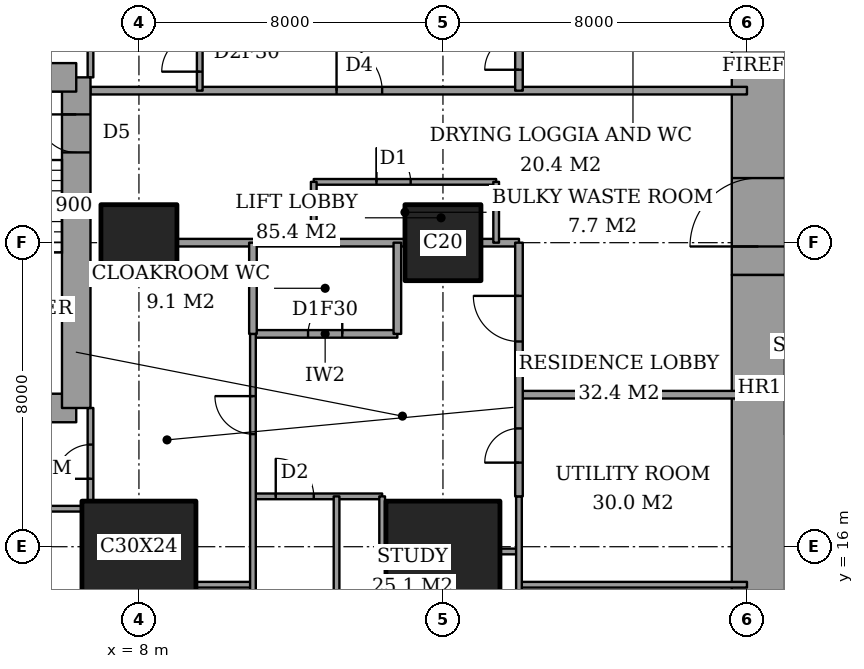
"""IFC4 building model, lengths in metres.
Left out: names, types, materials, properties, quantities, classifications, styles, units other than length and angle.
Written with IfcOpenShell. Run it as: python <this file> out.ifc"""

import sys

from ifc_helpers import new_model, si_unit, direction, frame, frame_2d, origin, origin_2d, place, context, subcontext, project, spatial, rectangle, extrude, element, fill, save


model = new_model("IFC4")
c1 = context("Model", 3, precision=1e-05, world=origin(), true_north=direction((0.0, 1.0)))
c2 = subcontext(c1, "Body", "Model", "MODEL_VIEW")
j1 = project(units=[si_unit("LENGTHUNIT", "METRE"), si_unit("PLANEANGLEUNIT", "RADIAN")], contexts=[c1])
p1 = place(None, origin())
s1 = spatial("IfcSite", under=j1, at=p1, CompositionType="ELEMENT")
p2 = place(p1, origin())
s2 = spatial("IfcBuilding", under=s1, at=p2, CompositionType="ELEMENT")
p3 = place(p2, frame((0.0, 0.0, 143.0)))
s3 = spatial("IfcBuildingStorey", under=s2, at=p3, CompositionType="ELEMENT", Elevation=143.0)
p4 = place(p3, frame((8.0, 16.0, 0.0), z_axis=(0.0, 0.0, 1.0), x_axis=(1.0, 0.0, 0.0)))
e1 = element("IfcColumn", 1, at=p4, inside=s3, PredefinedType="COLUMN", context=c2, shape_type="SweptSolid", body=[
    extrude(rectangle(XDim=3.0, YDim=2.4, at=origin_2d()), origin(), (0.0, 0.0, 1.0), 3.6),
])
p5 = place(p3, frame((8.0, 24.0, 0.0), z_axis=(0.0, 0.0, 1.0), x_axis=(1.0, 0.0, 0.0)))
e2 = element("IfcColumn", 2, at=p5, inside=s3, PredefinedType="COLUMN", context=c2, shape_type="SweptSolid", body=[
    extrude(rectangle(XDim=2.0, YDim=2.0, at=origin_2d()), origin(), (0.0, 0.0, 1.0), 3.6),
])
p6 = place(p3, frame((16.0, 16.0, 0.0), z_axis=(0.0, 0.0, 1.0), x_axis=(1.0, 0.0, 0.0)))
e3 = element("IfcColumn", 3, at=p6, inside=s3, PredefinedType="COLUMN", context=c2, shape_type="SweptSolid", body=[
    extrude(rectangle(XDim=3.0, YDim=2.4, at=origin_2d()), origin(), (0.0, 0.0, 1.0), 3.6),
])
p7 = place(p3, frame((16.0, 24.0, 0.0), z_axis=(0.0, 0.0, 1.0), x_axis=(1.0, 0.0, 0.0)))
e4 = element("IfcColumn", 4, at=p7, inside=s3, PredefinedType="COLUMN", context=c2, shape_type="SweptSolid", body=[
    extrude(rectangle(XDim=2.0, YDim=2.0, at=origin_2d()), origin(), (0.0, 0.0, 1.0), 3.6),
])
p8 = place(p3, frame((24.3, 13.0, 0.0), z_axis=(0.0, 0.0, 1.0), x_axis=(0.0, 1.0, 0.0)))
e5 = element("IfcWall", 5, at=p8, inside=s3, PredefinedType="SHEAR", context=c2, shape_type="SweptSolid", body=[
    extrude(rectangle(XDim=10.15, YDim=1.4, at=frame_2d((5.075, 0.0))), origin(), (0.0, 0.0, 1.0), 3.6),
])
p9 = place(p3, frame((24.3, 23.15, 0.0), z_axis=(0.0, 0.0, 1.0), x_axis=(0.0, 1.0, 0.0)))
e6 = element("IfcWall", 6, at=p9, inside=s3, PredefinedType="SHEAR", context=c2, shape_type="SweptSolid", body=[
    extrude(rectangle(XDim=11.85, YDim=1.4, at=frame_2d((5.925, 0.0))), origin(), (0.0, 0.0, 1.0), 3.6),
])
p10 = place(p9, frame((0.75, 0.0, 0.0)))
e7 = element("IfcOpeningElement", 7, at=p10, cuts=e6, PredefinedType="OPENING", context=c2, shape_type="SweptSolid", body=[
    extrude(rectangle(XDim=1.8, YDim=2.4, at=frame_2d((0.9, 1.2))), frame((0.0, 0.71, 0.0), z_axis=(0.0, -1.0, 0.0), x_axis=(1.0, 0.0, 0.0)), (0.0, 0.0, 1.0), 1.42),
])
p11 = place(p3, frame((1.9, 19.65, 0.0), z_axis=(0.0, 0.0, 1.0), x_axis=(1.0, 0.0, 0.0)))
e8 = element("IfcWall", 8, at=p11, inside=s3, PredefinedType="SHEAR", context=c2, shape_type="SweptSolid", body=[
    extrude(rectangle(XDim=4.45, YDim=0.75, at=frame_2d((2.225, 0.0))), origin(), (0.0, 0.0, 1.0), 3.6),
])
p12 = place(p3, frame((6.35, 19.65, 0.0), z_axis=(0.0, 0.0, 1.0), x_axis=(0.0, 1.0, 0.0)))
e9 = element("IfcWall", 9, at=p12, inside=s3, PredefinedType="SHEAR", context=c2, shape_type="SweptSolid", body=[
    extrude(rectangle(XDim=8.7, YDim=0.75, at=frame_2d((4.35, 0.0))), origin(), (0.0, 0.0, 1.0), 3.6),
])
p13 = place(p12, frame((6.725, 0.0, 0.0)))
e10 = element("IfcOpeningElement", 10, at=p13, cuts=e9, PredefinedType="OPENING", context=c2, shape_type="SweptSolid", body=[
    extrude(rectangle(XDim=1.0, YDim=2.1, at=frame_2d((0.5, 1.05))), frame((0.0, 0.385, 0.0), z_axis=(0.0, -1.0, 0.0), x_axis=(1.0, 0.0, 0.0)), (0.0, 0.0, 1.0), 0.77),
])
p14 = place(p3, frame((6.35, 28.35, 0.0), z_axis=(0.0, 0.0, 1.0), x_axis=(-1.0, 0.0, 0.0)))
e11 = element("IfcWall", 11, at=p14, inside=s3, PredefinedType="SHEAR", context=c2, shape_type="SweptSolid", body=[
    extrude(rectangle(XDim=4.45, YDim=0.75, at=frame_2d((2.225, 0.0))), origin(), (0.0, 0.0, 1.0), 3.6),
])
p15 = place(p3, frame((9.5, 15.0, 0.0), z_axis=(0.0, 0.0, 1.0), x_axis=(1.0, 0.0, 0.0)))
e12 = element("IfcWall", 12, at=p15, inside=s3, PredefinedType="PARTITIONING", context=c2, shape_type="SweptSolid", body=[
    extrude(rectangle(XDim=1.5, YDim=0.15, at=frame_2d((0.75, 0.0))), origin(), (0.0, 0.0, 1.0), 3.35),
])
p16 = place(p3, frame((18.0, 15.0, 0.0), z_axis=(0.0, 0.0, 1.0), x_axis=(1.0, 0.0, 0.0)))
e13 = element("IfcWall", 13, at=p16, inside=s3, PredefinedType="PARTITIONING", context=c2, shape_type="SweptSolid", body=[
    extrude(rectangle(XDim=6.0, YDim=0.15, at=frame_2d((3.0, 0.0))), origin(), (0.0, 0.0, 1.0), 3.35),
])
p17 = place(p3, frame((17.5, 15.875, 0.0), z_axis=(0.0, 0.0, 1.0), x_axis=(1.0, 0.0, 0.0)))
e14 = element("IfcWall", 14, at=p17, inside=s3, PredefinedType="PARTITIONING", context=c2, shape_type="SweptSolid", body=[
    extrude(rectangle(XDim=0.5, YDim=0.15, at=frame_2d((0.25, 0.0))), origin(), (0.0, 0.0, 1.0), 2.634),
])
p18 = place(p3, frame((1.35, 17.0, 0.0), z_axis=(0.0, 0.0, 1.0), x_axis=(1.0, 0.0, 0.0)))
e15 = element("IfcWall", 15, at=p18, inside=s3, PredefinedType="PARTITIONING", context=c2, shape_type="SweptSolid", body=[
    extrude(rectangle(XDim=5.15, YDim=0.15, at=frame_2d((2.575, 0.0))), origin(), (0.0, 0.0, 1.0), 3.35),
])
p19 = place(p3, frame((11.0, 17.325, 0.0), z_axis=(0.0, 0.0, 1.0), x_axis=(1.0, 0.0, 0.0)))
e16 = element("IfcWall", 16, at=p19, inside=s3, PredefinedType="PARTITIONING", context=c2, shape_type="SweptSolid", body=[
    extrude(rectangle(XDim=3.4, YDim=0.15, at=frame_2d((1.7, 0.0))), origin(), (0.0, 0.0, 1.0), 3.35),
])
p20 = place(p19, frame((0.6, 0.0, 0.0)))
e17 = element("IfcOpeningElement", 17, at=p20, cuts=e16, PredefinedType="OPENING", context=c2, shape_type="SweptSolid", body=[
    extrude(rectangle(XDim=1.0, YDim=2.1, at=frame_2d((0.5, 1.05))), frame((0.0, 0.085, 0.0), z_axis=(0.0, -1.0, 0.0), x_axis=(1.0, 0.0, 0.0)), (0.0, 0.0, 1.0), 0.17),
])
p21 = place(p3, frame((18.0, 20.0, 0.0), z_axis=(0.0, 0.0, 1.0), x_axis=(1.0, 0.0, 0.0)))
e18 = element("IfcWall", 18, at=p21, inside=s3, PredefinedType="PARTITIONING", context=c2, shape_type="SweptSolid", body=[
    extrude(rectangle(XDim=6.0, YDim=0.2, at=frame_2d((3.0, 0.0))), origin(), (0.0, 0.0, 1.0), 3.35),
])
p22 = place(p3, frame((11.0, 21.6, 0.0), z_axis=(0.0, 0.0, 1.0), x_axis=(1.0, 0.0, 0.0)))
e19 = element("IfcWall", 19, at=p22, inside=s3, PredefinedType="PARTITIONING", context=c2, shape_type="SweptSolid", body=[
    extrude(rectangle(XDim=3.8, YDim=0.2, at=frame_2d((1.9, 0.0))), origin(), (0.0, 0.0, 1.0), 3.35),
])
p23 = place(p22, frame((1.45, 0.0, 0.0)))
e20 = element("IfcOpeningElement", 20, at=p23, cuts=e19, PredefinedType="OPENING", context=c2, shape_type="SweptSolid", body=[
    extrude(rectangle(XDim=0.9, YDim=2.1, at=frame_2d((0.45, 1.05))), frame((0.0, 0.11, 0.0), z_axis=(0.0, -1.0, 0.0), x_axis=(1.0, 0.0, 0.0)), (0.0, 0.0, 1.0), 0.22),
])
p24 = place(p3, frame((9.0, 24.0, 0.0), z_axis=(0.0, 0.0, 1.0), x_axis=(1.0, 0.0, 0.0)))
e21 = element("IfcWall", 21, at=p24, inside=s3, PredefinedType="PARTITIONING", context=c2, shape_type="SweptSolid", body=[
    extrude(rectangle(XDim=6.0, YDim=0.2, at=frame_2d((3.0, 0.0))), origin(), (0.0, 0.0, 1.0), 3.35),
])
p25 = place(p3, frame((17.0, 24.0, 0.0), z_axis=(0.0, 0.0, 1.0), x_axis=(1.0, 0.0, 0.0)))
e22 = element("IfcWall", 22, at=p25, inside=s3, PredefinedType="PARTITIONING", context=c2, shape_type="SweptSolid", body=[
    extrude(rectangle(XDim=1.0, YDim=0.2, at=frame_2d((0.5, 0.0))), origin(), (0.0, 0.0, 1.0), 3.35),
])
p26 = place(p3, frame((12.6, 25.6, 0.0), z_axis=(0.0, 0.0, 1.0), x_axis=(1.0, 0.0, 0.0)))
e23 = element("IfcWall", 23, at=p26, inside=s3, PredefinedType="PARTITIONING", context=c2, shape_type="SweptSolid", body=[
    extrude(rectangle(XDim=4.8, YDim=0.15, at=frame_2d((2.4, 0.0))), origin(), (0.0, 0.0, 1.0), 3.35),
])
p27 = place(p26, frame((1.65, 0.0, 0.0)))
e24 = element("IfcOpeningElement", 24, at=p27, cuts=e23, PredefinedType="OPENING", context=c2, shape_type="SweptSolid", body=[
    extrude(rectangle(XDim=0.9, YDim=2.1, at=frame_2d((0.45, 1.05))), frame((0.0, 0.085, 0.0), z_axis=(0.0, -1.0, 0.0), x_axis=(1.0, 0.0, 0.0)), (0.0, 0.0, 1.0), 0.17),
])
p28 = place(p3, frame((6.725, 28.0, 0.0), z_axis=(0.0, 0.0, 1.0), x_axis=(1.0, 0.0, 0.0)))
e25 = element("IfcWall", 25, at=p28, inside=s3, PredefinedType="PARTITIONING", context=c2, shape_type="SweptSolid", body=[
    extrude(rectangle(XDim=17.275, YDim=0.2, at=frame_2d((8.637, 0.0))), origin(), (0.0, 0.0, 1.0), 3.35),
])
p29 = place(p28, frame((6.475, 0.0, 0.0)))
e26 = element("IfcOpeningElement", 26, at=p29, cuts=e25, PredefinedType="OPENING", context=c2, shape_type="SweptSolid", body=[
    extrude(rectangle(XDim=1.2, YDim=2.4, at=frame_2d((0.6, 1.2))), frame((0.0, 0.11, 0.0), z_axis=(0.0, -1.0, 0.0), x_axis=(1.0, 0.0, 0.0)), (0.0, 0.0, 1.0), 0.22),
])
p30 = place(p3, frame((6.725, 17.2, 0.0), z_axis=(0.0, 0.0, 1.0), x_axis=(0.0, 1.0, 0.0)))
e27 = element("IfcWall", 27, at=p30, inside=s3, PredefinedType="PARTITIONING", context=c2, shape_type="SweptSolid", body=[
    extrude(rectangle(XDim=2.45, YDim=0.15, at=frame_2d((1.225, 0.0))), origin(), (0.0, 0.0, 1.0), 3.35),
])
p31 = place(p30, frame((0.587, 0.0, 0.0)))
e28 = element("IfcOpeningElement", 28, at=p31, cuts=e27, PredefinedType="OPENING", context=c2, shape_type="SweptSolid", body=[
    extrude(rectangle(XDim=0.9, YDim=2.1, at=frame_2d((0.45, 1.05))), frame((0.0, 0.085, 0.0), z_axis=(0.0, -1.0, 0.0), x_axis=(1.0, 0.0, 0.0)), (0.0, 0.0, 1.0), 0.17),
])
p32 = place(p3, frame((6.725, 28.35, 0.0), z_axis=(0.0, 0.0, 1.0), x_axis=(0.0, 1.0, 0.0)))
e29 = element("IfcWall", 29, at=p32, inside=s3, PredefinedType="PARTITIONING", context=c2, shape_type="SweptSolid", body=[
    extrude(rectangle(XDim=2.45, YDim=0.15, at=frame_2d((1.225, 0.0))), origin(), (0.0, 0.0, 1.0), 3.35),
])
p33 = place(p32, frame((0.913, 0.0, 0.0)))
e30 = element("IfcOpeningElement", 30, at=p33, cuts=e29, PredefinedType="OPENING", context=c2, shape_type="SweptSolid", body=[
    extrude(rectangle(XDim=1.0, YDim=2.1, at=frame_2d((0.5, 1.05))), frame((0.0, 0.085, 0.0), z_axis=(0.0, -1.0, 0.0), x_axis=(1.0, 0.0, 0.0)), (0.0, 0.0, 1.0), 0.17),
])
p34 = place(p3, frame((9.6, 28.0, 0.0), z_axis=(0.0, 0.0, 1.0), x_axis=(0.0, 1.0, 0.0)))
e31 = element("IfcWall", 31, at=p34, inside=s3, PredefinedType="PARTITIONING", context=c2, shape_type="SweptSolid", body=[
    extrude(rectangle(XDim=9.4, YDim=0.15, at=frame_2d((4.7, 0.0))), origin(), (0.0, 0.0, 1.0), 3.35),
])
p35 = place(p34, frame((0.5, 0.0, 0.0)))
e32 = element("IfcOpeningElement", 32, at=p35, cuts=e31, PredefinedType="OPENING", context=c2, shape_type="SweptSolid", body=[
    extrude(rectangle(XDim=1.0, YDim=2.1, at=frame_2d((0.5, 1.05))), frame((0.0, 0.085, 0.0), z_axis=(0.0, -1.0, 0.0), x_axis=(1.0, 0.0, 0.0)), (0.0, 0.0, 1.0), 0.17),
])
p36 = place(p3, frame((11.0, 21.6, 0.0), z_axis=(0.0, 0.0, 1.0), x_axis=(0.0, 1.0, 0.0)))
e33 = element("IfcWall", 33, at=p36, inside=s3, PredefinedType="PARTITIONING", context=c2, shape_type="SweptSolid", body=[
    extrude(rectangle(XDim=2.4, YDim=0.2, at=frame_2d((1.2, 0.0))), origin(), (0.0, 0.0, 1.0), 3.35),
])
p37 = place(p3, frame((11.0, 11.0, 0.0), z_axis=(0.0, 0.0, 1.0), x_axis=(0.0, 1.0, 0.0)))
e34 = element("IfcWall", 34, at=p37, inside=s3, PredefinedType="PARTITIONING", context=c2, shape_type="SweptSolid", body=[
    extrude(rectangle(XDim=10.6, YDim=0.15, at=frame_2d((5.3, 0.0))), origin(), (0.0, 0.0, 1.0), 3.35),
])
p38 = place(p37, frame((7.962, 0.0, 0.0)))
e35 = element("IfcOpeningElement", 35, at=p38, cuts=e34, PredefinedType="OPENING", context=c2, shape_type="SweptSolid", body=[
    extrude(rectangle(XDim=1.0, YDim=2.1, at=frame_2d((0.5, 1.05))), frame((0.0, 0.085, 0.0), z_axis=(0.0, -1.0, 0.0), x_axis=(1.0, 0.0, 0.0)), (0.0, 0.0, 1.0), 0.17),
])
p39 = place(p3, frame((12.6, 24.0, 0.0), z_axis=(0.0, 0.0, 1.0), x_axis=(0.0, 1.0, 0.0)))
e36 = element("IfcWall", 36, at=p39, inside=s3, PredefinedType="PARTITIONING", context=c2, shape_type="SweptSolid", body=[
    extrude(rectangle(XDim=1.6, YDim=0.15, at=frame_2d((0.8, 0.0))), origin(), (0.0, 0.0, 1.0), 3.35),
])
p40 = place(p3, frame((13.2, 11.0, 0.0), z_axis=(0.0, 0.0, 1.0), x_axis=(0.0, 1.0, 0.0)))
e37 = element("IfcWall", 37, at=p40, inside=s3, PredefinedType="PARTITIONING", context=c2, shape_type="SweptSolid", body=[
    extrude(rectangle(XDim=6.325, YDim=0.15, at=frame_2d((3.163, 0.0))), origin(), (0.0, 0.0, 1.0), 3.35),
])
p41 = place(p3, frame((14.4, 15.875, 0.0), z_axis=(0.0, 0.0, 1.0), x_axis=(0.0, 1.0, 0.0)))
e38 = element("IfcWall", 38, at=p41, inside=s3, PredefinedType="PARTITIONING", context=c2, shape_type="SweptSolid", body=[
    extrude(rectangle(XDim=1.45, YDim=0.15, at=frame_2d((0.725, 0.0))), origin(), (0.0, 0.0, 1.0), 3.35),
])
p42 = place(p3, frame((14.8, 21.6, 0.0), z_axis=(0.0, 0.0, 1.0), x_axis=(0.0, 1.0, 0.0)))
e39 = element("IfcWall", 39, at=p42, inside=s3, PredefinedType="PARTITIONING", context=c2, shape_type="SweptSolid", body=[
    extrude(rectangle(XDim=2.4, YDim=0.2, at=frame_2d((1.2, 0.0))), origin(), (0.0, 0.0, 1.0), 3.35),
])
p43 = place(p3, frame((17.4, 24.0, 0.0), z_axis=(0.0, 0.0, 1.0), x_axis=(0.0, 1.0, 0.0)))
e40 = element("IfcWall", 40, at=p43, inside=s3, PredefinedType="PARTITIONING", context=c2, shape_type="SweptSolid", body=[
    extrude(rectangle(XDim=1.6, YDim=0.15, at=frame_2d((0.8, 0.0))), origin(), (0.0, 0.0, 1.0), 3.35),
])
p44 = place(p3, frame((18.0, 17.325, 0.0), z_axis=(0.0, 0.0, 1.0), x_axis=(0.0, 1.0, 0.0)))
e41 = element("IfcWall", 41, at=p44, inside=s3, PredefinedType="PARTITIONING", context=c2, shape_type="SweptSolid", body=[
    extrude(rectangle(XDim=6.675, YDim=0.2, at=frame_2d((3.337, 0.0))), origin(), (0.0, 0.0, 1.0), 3.35),
])
p45 = place(p44, frame((4.075, 0.0, 0.0)))
e42 = element("IfcOpeningElement", 42, at=p45, cuts=e41, PredefinedType="OPENING", context=c2, shape_type="SweptSolid", body=[
    extrude(rectangle(XDim=1.2, YDim=2.4, at=frame_2d((0.6, 1.2))), frame((0.0, 0.11, 0.0), z_axis=(0.0, -1.0, 0.0), x_axis=(1.0, 0.0, 0.0)), (0.0, 0.0, 1.0), 0.22),
])
p46 = place(p44, frame((0.887, 0.0, 0.0)))
e43 = element("IfcOpeningElement", 43, at=p46, cuts=e41, PredefinedType="OPENING", context=c2, shape_type="SweptSolid", body=[
    extrude(rectangle(XDim=0.9, YDim=2.1, at=frame_2d((0.45, 1.05))), frame((0.0, 0.11, 0.0), z_axis=(0.0, -1.0, 0.0), x_axis=(1.0, 0.0, 0.0)), (0.0, 0.0, 1.0), 0.22),
])
p47 = place(p3, frame((18.0, 28.0, 0.0), z_axis=(0.0, 0.0, 1.0), x_axis=(0.0, 1.0, 0.0)))
e44 = element("IfcWall", 44, at=p47, inside=s3, PredefinedType="PARTITIONING", context=c2, shape_type="SweptSolid", body=[
    extrude(rectangle(XDim=3.4, YDim=0.2, at=frame_2d((1.7, 0.0))), origin(), (0.0, 0.0, 1.0), 3.35),
])
p48 = place(p47, frame((0.55, 0.0, 0.0)))
e45 = element("IfcOpeningElement", 45, at=p48, cuts=e44, PredefinedType="OPENING", context=c2, shape_type="SweptSolid", body=[
    extrude(rectangle(XDim=0.9, YDim=2.1, at=frame_2d((0.45, 1.05))), frame((0.0, 0.11, 0.0), z_axis=(0.0, -1.0, 0.0), x_axis=(1.0, 0.0, 0.0)), (0.0, 0.0, 1.0), 0.22),
])
p49 = place(p3, frame((18.0, 11.0, 0.0), z_axis=(0.0, 0.0, 1.0), x_axis=(0.0, 1.0, 0.0)))
e46 = element("IfcWall", 46, at=p49, inside=s3, PredefinedType="PARTITIONING", context=c2, shape_type="SweptSolid", body=[
    extrude(rectangle(XDim=6.325, YDim=0.15, at=frame_2d((3.163, 0.0))), origin(), (0.0, 0.0, 1.0), 3.35),
])
p50 = place(p31, origin())
e47 = element("IfcDoor", 47, at=p50, inside=s3, OperationType="SINGLE_SWING_RIGHT", PredefinedType="DOOR", context=c2, shape_type="SweptSolid", body=[
    extrude(rectangle(XDim=0.9, YDim=2.1, at=frame_2d((0.45, 1.05))), frame((0.0, 0.025, 0.0), z_axis=(0.0, -1.0, 0.0), x_axis=(1.0, 0.0, 0.0)), (0.0, 0.0, 1.0), 0.05),
])
fill(e28, e47)
p51 = place(p38, origin())
e48 = element("IfcDoor", 48, at=p51, inside=s3, OperationType="SINGLE_SWING_LEFT", PredefinedType="DOOR", context=c2, shape_type="SweptSolid", body=[
    extrude(rectangle(XDim=1.0, YDim=2.1, at=frame_2d((0.5, 1.05))), frame((0.0, 0.025, 0.0), z_axis=(0.0, -1.0, 0.0), x_axis=(1.0, 0.0, 0.0)), (0.0, 0.0, 1.0), 0.05),
])
fill(e35, e48)
p52 = place(p23, origin())
e49 = element("IfcDoor", 49, at=p52, inside=s3, OperationType="SINGLE_SWING_LEFT", PredefinedType="DOOR", context=c2, shape_type="SweptSolid", body=[
    extrude(rectangle(XDim=0.9, YDim=2.1, at=frame_2d((0.45, 1.05))), frame((0.0, 0.025, 0.0), z_axis=(0.0, -1.0, 0.0), x_axis=(1.0, 0.0, 0.0)), (0.0, 0.0, 1.0), 0.05),
])
fill(e20, e49)
p53 = place(p45, origin())
e50 = element("IfcDoor", 50, at=p53, inside=s3, OperationType="SINGLE_SWING_LEFT", PredefinedType="DOOR", context=c2, shape_type="SweptSolid", body=[
    extrude(rectangle(XDim=1.2, YDim=2.4, at=frame_2d((0.6, 1.2))), frame((0.0, 0.025, 0.0), z_axis=(0.0, -1.0, 0.0), x_axis=(1.0, 0.0, 0.0)), (0.0, 0.0, 1.0), 0.05),
])
fill(e42, e50)
p54 = place(p20, origin())
e51 = element("IfcDoor", 51, at=p54, inside=s3, OperationType="SINGLE_SWING_RIGHT", PredefinedType="DOOR", context=c2, shape_type="SweptSolid", body=[
    extrude(rectangle(XDim=1.0, YDim=2.1, at=frame_2d((0.5, 1.05))), frame((0.0, 0.025, 0.0), z_axis=(0.0, -1.0, 0.0), x_axis=(1.0, 0.0, 0.0)), (0.0, 0.0, 1.0), 0.05),
])
fill(e17, e51)
p55 = place(p46, origin())
e52 = element("IfcDoor", 52, at=p55, inside=s3, OperationType="SINGLE_SWING_RIGHT", PredefinedType="DOOR", context=c2, shape_type="SweptSolid", body=[
    extrude(rectangle(XDim=0.9, YDim=2.1, at=frame_2d((0.45, 1.05))), frame((0.0, 0.025, 0.0), z_axis=(0.0, -1.0, 0.0), x_axis=(1.0, 0.0, 0.0)), (0.0, 0.0, 1.0), 0.05),
])
fill(e43, e52)
p56 = place(p35, origin())
e53 = element("IfcDoor", 53, at=p56, inside=s3, OperationType="SINGLE_SWING_RIGHT", PredefinedType="DOOR", context=c2, shape_type="SweptSolid", body=[
    extrude(rectangle(XDim=1.0, YDim=2.1, at=frame_2d((0.5, 1.05))), frame((0.0, 0.025, 0.0), z_axis=(0.0, -1.0, 0.0), x_axis=(1.0, 0.0, 0.0)), (0.0, 0.0, 1.0), 0.05),
])
fill(e32, e53)
p57 = place(p29, origin())
e54 = element("IfcDoor", 54, at=p57, inside=s3, OperationType="SINGLE_SWING_RIGHT", PredefinedType="DOOR", context=c2, shape_type="SweptSolid", body=[
    extrude(rectangle(XDim=1.2, YDim=2.4, at=frame_2d((0.6, 1.2))), frame((0.0, 0.025, 0.0), z_axis=(0.0, -1.0, 0.0), x_axis=(1.0, 0.0, 0.0)), (0.0, 0.0, 1.0), 0.05),
])
fill(e26, e54)
p58 = place(p48, origin())
e55 = element("IfcDoor", 55, at=p58, inside=s3, OperationType="SINGLE_SWING_RIGHT", PredefinedType="DOOR", context=c2, shape_type="SweptSolid", body=[
    extrude(rectangle(XDim=0.9, YDim=2.1, at=frame_2d((0.45, 1.05))), frame((0.0, 0.025, 0.0), z_axis=(0.0, -1.0, 0.0), x_axis=(1.0, 0.0, 0.0)), (0.0, 0.0, 1.0), 0.05),
])
fill(e45, e55)
p59 = place(p27, origin())
e56 = element("IfcDoor", 56, at=p59, inside=s3, OperationType="SINGLE_SWING_RIGHT", PredefinedType="DOOR", context=c2, shape_type="SweptSolid", body=[
    extrude(rectangle(XDim=0.9, YDim=2.1, at=frame_2d((0.45, 1.05))), frame((0.0, 0.025, 0.0), z_axis=(0.0, -1.0, 0.0), x_axis=(1.0, 0.0, 0.0)), (0.0, 0.0, 1.0), 0.05),
])
fill(e24, e56)
p60 = place(p10, origin())
e57 = element("IfcDoor", 57, at=p60, inside=s3, OperationType="DOUBLE_DOOR_DOUBLE_SWING", PredefinedType="DOOR", context=c2, shape_type="SweptSolid", body=[
    extrude(rectangle(XDim=1.8, YDim=2.4, at=frame_2d((0.9, 1.2))), frame((0.0, 0.025, 0.0), z_axis=(0.0, -1.0, 0.0), x_axis=(1.0, 0.0, 0.0)), (0.0, 0.0, 1.0), 0.05),
])
fill(e7, e57)
p61 = place(p13, origin())
e58 = element("IfcDoor", 58, at=p61, inside=s3, OperationType="SINGLE_SWING_LEFT", PredefinedType="DOOR", context=c2, shape_type="SweptSolid", body=[
    extrude(rectangle(XDim=1.0, YDim=2.1, at=frame_2d((0.5, 1.05))), frame((0.0, 0.025, 0.0), z_axis=(0.0, -1.0, 0.0), x_axis=(1.0, 0.0, 0.0)), (0.0, 0.0, 1.0), 0.05),
])
fill(e10, e58)
save(model, sys.argv[1])
